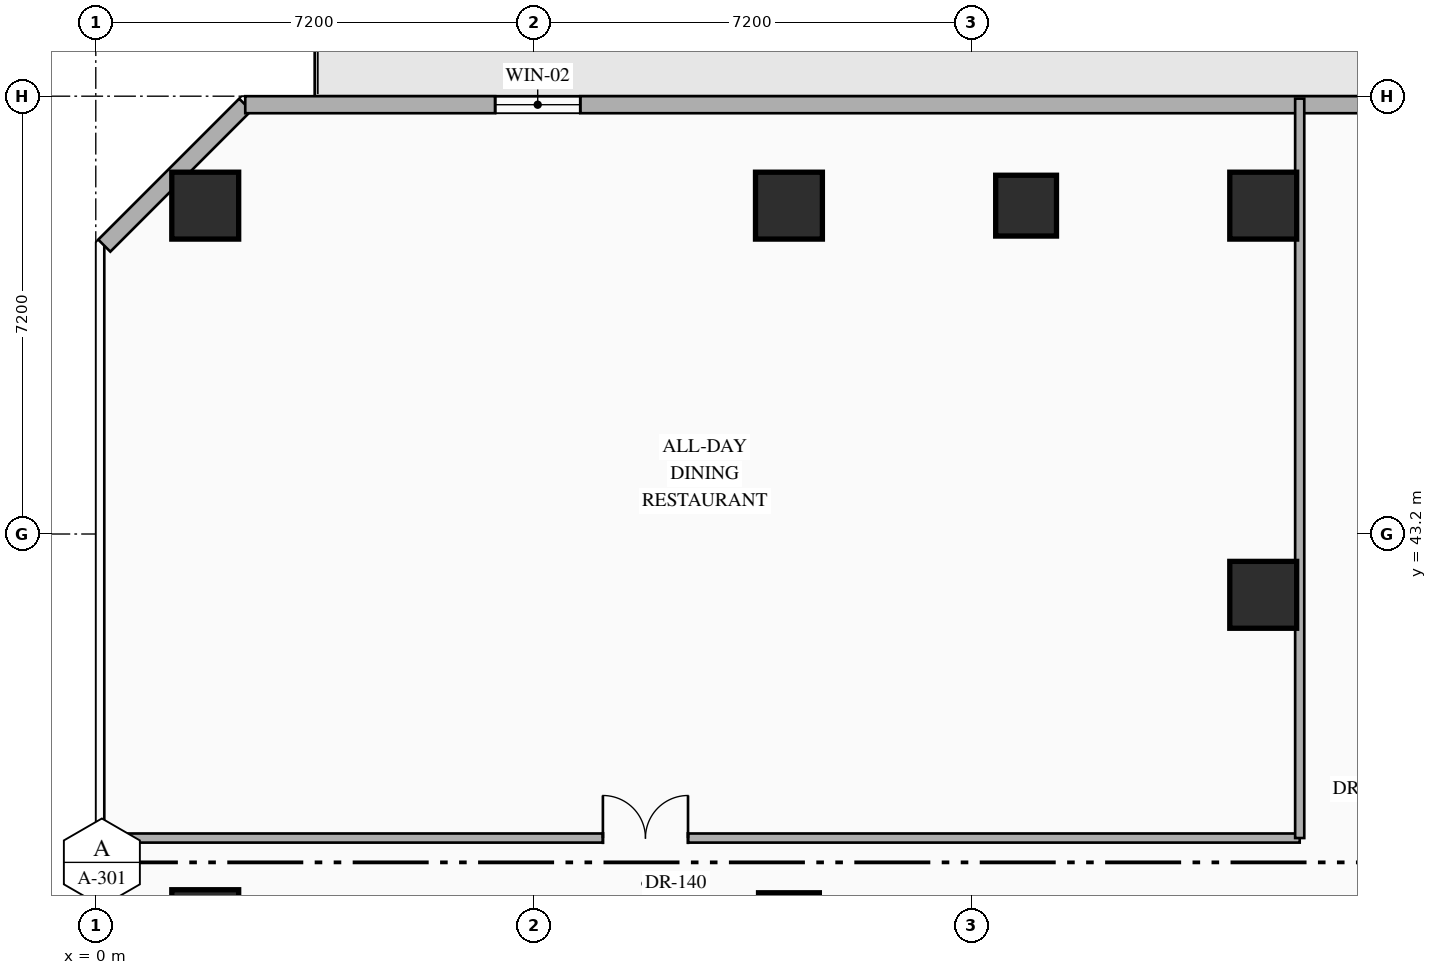
"""IFC4 building model, lengths in metres.
Left out: names, types, materials, properties, quantities, classifications, styles, units other than length and angle.
Written with IfcOpenShell. Run it as: python <this file> out.ifc"""

import sys

from ifc_helpers import new_model, si_unit, direction, frame, frame_2d, origin, origin_2d, place, context, subcontext, project, spatial, rectangle, hollow_rectangle, extrude, element, fill, save


model = new_model("IFC4")
c1 = context("Model", 3, precision=1e-05, world=origin(), true_north=direction((0.0, 1.0)))
c2 = subcontext(c1, "Body", "Model", "MODEL_VIEW")
j1 = project(units=[si_unit("LENGTHUNIT", "METRE"), si_unit("PLANEANGLEUNIT", "RADIAN")], contexts=[c1])
p1 = place(None, origin())
s1 = spatial("IfcSite", under=j1, at=p1, CompositionType="ELEMENT")
p2 = place(p1, origin())
s2 = spatial("IfcBuilding", under=s1, at=p2, CompositionType="ELEMENT")
p3 = place(p2, frame((0.0, 0.0, 32.1)))
s3 = spatial("IfcBuildingStorey", under=s2, at=p3, CompositionType="ELEMENT", Elevation=32.1)
for number, where, z_axis, x_axis in (
    (1, (1.8, 48.6, 0.0), (0.0, 0.0, 1.0), (1.0, 0.0, 0.0)),
    (2, (1.8, 36.8, 0.0), (0.0, 0.0, 1.0), (1.0, 0.0, 0.0)),
    (3, (11.4, 48.6, 0.0), (0.0, 0.0, 1.0), (1.0, 0.0, 0.0)),
    (4, (19.2, 48.6, 0.0), (0.0, 0.0, 1.0), (1.0, 0.0, 0.0)),
    (5, (19.2, 42.2, 0.0), (0.0, 0.0, 1.0), (1.0, 0.0, 0.0)),
):
    element("IfcColumn", number, at=place(p3, frame(where, z_axis=z_axis, x_axis=x_axis)), inside=s3, PredefinedType="COLUMN", context=c2, shape_type="SweptSolid", body=[
        extrude(hollow_rectangle(XDim=1.1, YDim=1.1, WallThickness=0.04, at=origin_2d()), origin(), (0.0, 0.0, 1.0), 4.5),
    ])
for number, where, z_axis, x_axis in (
    (6, (11.4, 36.8, 0.0), (0.0, 0.0, 1.0), (1.0, 0.0, 0.0)),
    (7, (15.3, 48.6, 0.0), (0.0, 0.0, 1.0), (1.0, 0.0, 0.0)),
):
    element("IfcColumn", number, at=place(p3, frame(where, z_axis=z_axis, x_axis=x_axis)), inside=s3, PredefinedType="COLUMN", context=c2, shape_type="SweptSolid", body=[
        extrude(hollow_rectangle(XDim=1.0, YDim=1.0, WallThickness=0.038, at=origin_2d()), origin(), (0.0, 0.0, 1.0), 4.5),
    ])
p4 = place(p3, frame((0.14, 47.942, 0.0), z_axis=(0.0, 0.0, 1.0), x_axis=(0.707106781187, 0.707106781187, 0.0)))
e8 = element("IfcWall", 8, at=p4, inside=s3, PredefinedType="STANDARD", context=c2, shape_type="SweptSolid", body=[
    extrude(rectangle(XDim=3.278, YDim=0.28, at=frame_2d((1.639, 0.0))), origin(), (0.0, 0.0, 1.0), 4.28),
])
p5 = place(p3, frame((2.458, 50.26, 0.0), z_axis=(0.0, 0.0, 1.0), x_axis=(1.0, 0.0, 0.0)))
e9 = element("IfcWall", 9, at=p5, inside=s3, PredefinedType="STANDARD", context=c2, shape_type="SweptSolid", body=[
    extrude(rectangle(XDim=40.084, YDim=0.28, at=frame_2d((20.042, 0.0))), origin(), (0.0, 0.0, 1.0), 4.28),
])
p6 = place(p5, frame((19.792, 0.0, 0.0)))
e10 = element("IfcOpeningElement", 10, at=p6, cuts=e9, PredefinedType="OPENING", context=c2, shape_type="SweptSolid", body=[
    extrude(rectangle(XDim=1.1, YDim=2.2, at=frame_2d((0.55, 1.1))), frame((0.0, 0.15, 0.0), z_axis=(0.0, -1.0, 0.0), x_axis=(1.0, 0.0, 0.0)), (0.0, 0.0, 1.0), 0.3),
])
p7 = place(p5, frame((4.11, 0.0, 0.85)))
e11 = element("IfcOpeningElement", 11, at=p7, cuts=e9, PredefinedType="OPENING", context=c2, shape_type="SweptSolid", body=[
    extrude(rectangle(XDim=1.4, YDim=1.8, at=frame_2d((0.7, 0.9))), frame((0.0, 0.15, 0.0), z_axis=(0.0, -1.0, 0.0), x_axis=(1.0, 0.0, 0.0)), (0.0, 0.0, 1.0), 0.3),
])
p8 = place(p3, frame((0.04, 38.2, 0.0), z_axis=(0.0, 0.0, 1.0), x_axis=(1.0, 0.0, 0.0)))
e12 = element("IfcWall", 12, at=p8, inside=s3, PredefinedType="PARTITIONING", context=c2, shape_type="SweptSolid", body=[
    extrude(rectangle(XDim=19.76, YDim=0.15, at=frame_2d((9.88, 0.0))), origin(), (0.0, 0.0, 1.0), 4.28),
])
p9 = place(p8, frame((8.3, 0.0, 0.0)))
e13 = element("IfcOpeningElement", 13, at=p9, cuts=e12, PredefinedType="OPENING", context=c2, shape_type="SweptSolid", body=[
    extrude(rectangle(XDim=1.4, YDim=2.3, at=frame_2d((0.7, 1.15))), frame((0.0, 0.085, 0.0), z_axis=(0.0, -1.0, 0.0), x_axis=(1.0, 0.0, 0.0)), (0.0, 0.0, 1.0), 0.17),
])
p10 = place(p3, frame((19.8, 38.2, 0.0), z_axis=(0.0, 0.0, 1.0), x_axis=(0.0, 1.0, 0.0)))
e14 = element("IfcWall", 14, at=p10, inside=s3, PredefinedType="PARTITIONING", context=c2, shape_type="SweptSolid", body=[
    extrude(rectangle(XDim=12.16, YDim=0.15, at=frame_2d((6.08, 0.0))), origin(), (0.0, 0.0, 1.0), 4.28),
])
p11 = place(p7, origin())
e15 = element("IfcWindow", 15, at=p11, inside=s3, PartitioningType="SINGLE_PANEL", PredefinedType="WINDOW", context=c2, shape_type="SweptSolid", body=[
    extrude(rectangle(XDim=1.4, YDim=1.8, at=frame_2d((0.7, 0.9))), frame((0.0, 0.03, 0.0), z_axis=(0.0, -1.0, 0.0), x_axis=(1.0, 0.0, 0.0)), (0.0, 0.0, 1.0), 0.06),
])
fill(e11, e15)
p12 = place(p9, origin())
e16 = element("IfcDoor", 16, at=p12, inside=s3, OperationType="DOUBLE_DOOR_SINGLE_SWING", PredefinedType="DOOR", context=c2, shape_type="SweptSolid", body=[
    extrude(rectangle(XDim=1.4, YDim=2.3, at=frame_2d((0.7, 1.15))), frame((0.0, 0.025, 0.0), z_axis=(0.0, -1.0, 0.0), x_axis=(1.0, 0.0, 0.0)), (0.0, 0.0, 1.0), 0.05),
])
fill(e13, e16)
save(model, sys.argv[1])
